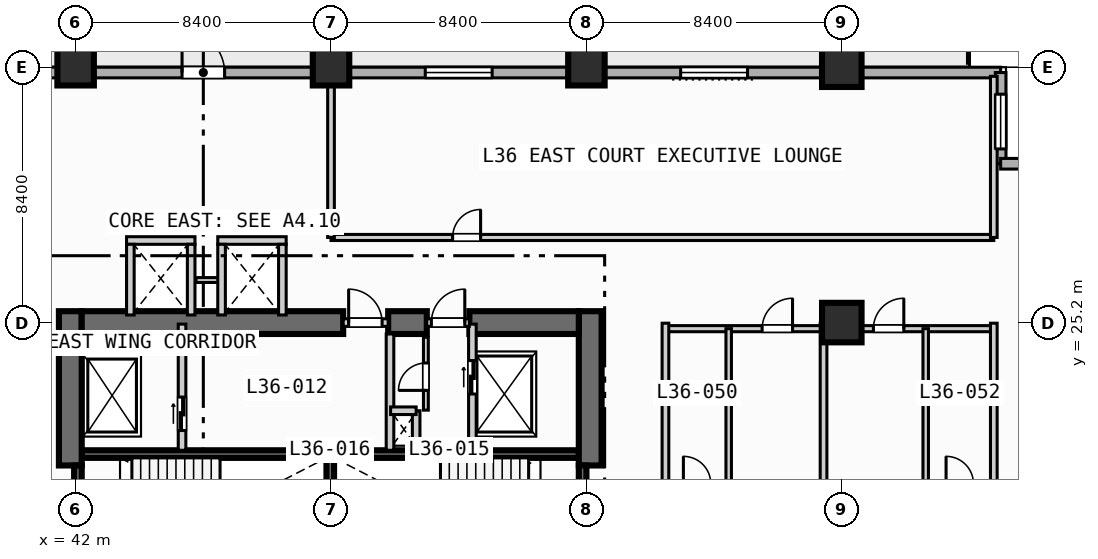
"""IFC4 building model, lengths in metres.
Left out: names, types, materials, properties, quantities, classifications, styles, units other than length and angle.
Written with IfcOpenShell. Run it as: python <this file> out.ifc"""

import sys

from ifc_helpers import new_model, si_unit, direction, frame, frame_2d, origin, origin_2d, place, context, subcontext, project, spatial, rectangle, extrude, element, fill, save


model = new_model("IFC4")
c1 = context("Model", 3, precision=1e-05, world=origin(), true_north=direction((0.0, 1.0)))
c2 = subcontext(c1, "Body", "Model", "MODEL_VIEW")
j1 = project(units=[si_unit("LENGTHUNIT", "METRE"), si_unit("PLANEANGLEUNIT", "RADIAN")], contexts=[c1])
p1 = place(None, origin())
s1 = spatial("IfcSite", under=j1, at=p1, CompositionType="ELEMENT")
p2 = place(p1, origin())
s2 = spatial("IfcBuilding", under=s1, at=p2, CompositionType="ELEMENT")
p3 = place(p2, frame((0.0, 0.0, 149.4)))
s3 = spatial("IfcBuildingStorey", under=s2, at=p3, CompositionType="ELEMENT", Elevation=149.4)
for number, where, z_axis, x_axis in (
    (1, (42.2, 20.875, 0.0), (0.0, 0.0, 1.0), (1.0, 0.0, 0.0)),
    (2, (50.5, 20.875, 0.0), (0.0, 0.0, 1.0), (1.0, 0.0, 0.0)),
):
    element("IfcWall", number, at=place(p3, frame(where, z_axis=z_axis, x_axis=x_axis)), inside=s3, PredefinedType="SOLIDWALL", context=c2, shape_type="SweptSolid", body=[
        extrude(rectangle(XDim=8.05, YDim=0.25, at=frame_2d((4.025, 0.0))), origin(), (0.0, 0.0, 1.0), 3.55),
    ])
p4 = place(p3, frame((50.375, 17.25, 0.0), z_axis=(0.0, 0.0, 1.0), x_axis=(0.0, 1.0, 0.0)))
e3 = element("IfcWall", 3, at=p4, inside=s3, PredefinedType="SOLIDWALL", context=c2, shape_type="SweptSolid", body=[
    extrude(rectangle(XDim=3.5, YDim=0.25, at=frame_2d((1.75, 0.0))), origin(), (0.0, 0.0, 1.0), 3.55),
])
for number, where, z_axis, x_axis in (
    (4, (41.825, 20.5, 0.0), (0.0, 0.0, 1.0), (0.0, 1.0, 0.0)),
    (5, (58.925, 20.5, 0.0), (0.0, 0.0, 1.0), (0.0, 1.0, 0.0)),
):
    element("IfcWall", number, at=place(p3, frame(where, z_axis=z_axis, x_axis=x_axis)), inside=s3, PredefinedType="SHEAR", context=c2, shape_type="SweptSolid", body=[
        extrude(rectangle(XDim=5.075, YDim=0.75, at=frame_2d((2.538, 0.0))), origin(), (0.0, 0.0, 1.0), 3.55),
    ])
p5 = place(p3, frame((42.2, 25.2, 0.0), z_axis=(0.0, 0.0, 1.0), x_axis=(1.0, 0.0, 0.0)))
e6 = element("IfcWall", 6, at=p5, inside=s3, PredefinedType="SHEAR", context=c2, shape_type="SweptSolid", body=[
    extrude(rectangle(XDim=8.6, YDim=0.75, at=frame_2d((4.3, 0.0))), origin(), (0.0, 0.0, 1.0), 3.55),
])
p6 = place(p3, frame((52.28, 25.2, 0.0), z_axis=(0.0, 0.0, 1.0), x_axis=(1.0, 0.0, 0.0)))
e7 = element("IfcWall", 7, at=p6, inside=s3, PredefinedType="SHEAR", context=c2, shape_type="SweptSolid", body=[
    extrude(rectangle(XDim=1.27, YDim=0.75, at=frame_2d((0.635, 0.0))), origin(), (0.0, 0.0, 1.0), 3.55),
])
p7 = place(p3, frame((54.95, 25.2, 0.0), z_axis=(0.0, 0.0, 1.0), x_axis=(1.0, 0.0, 0.0)))
e8 = element("IfcWall", 8, at=p7, inside=s3, PredefinedType="SHEAR", context=c2, shape_type="SweptSolid", body=[
    extrude(rectangle(XDim=3.6, YDim=0.75, at=frame_2d((1.8, 0.0))), origin(), (0.0, 0.0, 1.0), 3.55),
])
for number, where, z_axis, x_axis in (
    (9, (42.0, 33.6, 0.0), (0.0, 0.0, 1.0), (1.0, 0.0, 0.0)),
    (10, (50.4, 33.6, 0.0), (0.0, 0.0, 1.0), (1.0, 0.0, 0.0)),
    (11, (58.8, 33.6, 0.0), (0.0, 0.0, 1.0), (1.0, 0.0, 0.0)),
):
    element("IfcColumn", number, at=place(p3, frame(where, z_axis=z_axis, x_axis=x_axis)), inside=s3, PredefinedType="COLUMN", context=c2, shape_type="SweptSolid", body=[
        extrude(rectangle(XDim=1.2, YDim=1.2, at=origin_2d()), origin(), (0.0, 0.0, 1.0), 3.8),
    ])
for number, where, z_axis, x_axis in (
    (12, (67.2, 25.2, 0.0), (0.0, 0.0, 1.0), (1.0, 0.0, 0.0)),
    (13, (67.2, 33.6, 0.0), (0.0, 0.0, 1.0), (1.0, 0.0, 0.0)),
):
    element("IfcColumn", number, at=place(p3, frame(where, z_axis=z_axis, x_axis=x_axis)), inside=s3, PredefinedType="COLUMN", context=c2, shape_type="SweptSolid", body=[
        extrude(rectangle(XDim=1.3, YDim=1.3, at=origin_2d()), origin(), (0.0, 0.0, 1.0), 3.8),
    ])
p8 = place(p3, frame((33.425, 33.425, 0.0), z_axis=(0.0, 0.0, 1.0), x_axis=(1.0, 0.0, 0.0)))
e14 = element("IfcWall", 14, at=p8, inside=s3, PredefinedType="STANDARD", context=c2, shape_type="SweptSolid", body=[
    extrude(rectangle(XDim=39.0, YDim=0.35, at=frame_2d((19.5, 0.0))), origin(), (0.0, 0.0, 1.0), 3.55),
])
p9 = place(p8, frame((12.075, 0.0, 0.0)))
e15 = element("IfcOpeningElement", 15, at=p9, cuts=e14, PredefinedType="OPENING", context=c2, shape_type="SweptSolid", body=[
    extrude(rectangle(XDim=1.4, YDim=2.2, at=frame_2d((0.7, 1.1))), frame((0.0, 0.185, 0.0), z_axis=(0.0, -1.0, 0.0), x_axis=(1.0, 0.0, 0.0)), (0.0, 0.0, 1.0), 0.37),
])
p10 = place(p8, frame((20.075, 0.0, 0.85)))
e16 = element("IfcOpeningElement", 16, at=p10, cuts=e14, PredefinedType="OPENING", context=c2, shape_type="SweptSolid", body=[
    extrude(rectangle(XDim=2.2, YDim=1.8, at=frame_2d((1.1, 0.9))), frame((0.0, 0.185, 0.0), z_axis=(0.0, -1.0, 0.0), x_axis=(1.0, 0.0, 0.0)), (0.0, 0.0, 1.0), 0.37),
])
p11 = place(p8, frame((28.475, 0.0, 0.85)))
e17 = element("IfcOpeningElement", 17, at=p11, cuts=e14, PredefinedType="OPENING", context=c2, shape_type="SweptSolid", body=[
    extrude(rectangle(XDim=2.2, YDim=1.8, at=frame_2d((1.1, 0.9))), frame((0.0, 0.185, 0.0), z_axis=(0.0, -1.0, 0.0), x_axis=(1.0, 0.0, 0.0)), (0.0, 0.0, 1.0), 0.37),
])
p12 = place(p3, frame((72.425, 33.425, 0.0), z_axis=(0.0, 0.0, 1.0), x_axis=(0.0, -1.0, 0.0)))
e18 = element("IfcWall", 18, at=p12, inside=s3, PredefinedType="STANDARD", context=c2, shape_type="SweptSolid", body=[
    extrude(rectangle(XDim=3.0, YDim=0.35, at=frame_2d((1.5, 0.0))), origin(), (0.0, 0.0, 1.0), 3.55),
])
p13 = place(p12, frame((0.712, 0.0, 0.85)))
e19 = element("IfcOpeningElement", 19, at=p13, cuts=e18, PredefinedType="OPENING", context=c2, shape_type="SweptSolid", body=[
    extrude(rectangle(XDim=1.8, YDim=1.8, at=frame_2d((0.9, 0.9))), frame((0.0, 0.185, 0.0), z_axis=(0.0, -1.0, 0.0), x_axis=(1.0, 0.0, 0.0)), (0.0, 0.0, 1.0), 0.37),
])
p14 = place(p3, frame((72.425, 30.425, 0.0), z_axis=(0.0, 0.0, 1.0), x_axis=(1.0, 0.0, 0.0)))
e20 = element("IfcWall", 20, at=p14, inside=s3, PredefinedType="STANDARD", context=c2, shape_type="SweptSolid", body=[
    extrude(rectangle(XDim=3.0, YDim=0.35, at=frame_2d((1.5, 0.0))), origin(), (0.0, 0.0, 1.0), 3.55),
])
p15 = place(p3, frame((42.075, 18.0, 0.0), z_axis=(0.0, 0.0, 1.0), x_axis=(0.0, 1.0, 0.0)))
e21 = element("IfcWall", 21, at=p15, inside=s3, PredefinedType="SOLIDWALL", context=c2, shape_type="SweptSolid", body=[
    extrude(rectangle(XDim=2.5, YDim=0.25, at=frame_2d((1.25, 0.0))), origin(), (0.0, 0.0, 1.0), 3.55),
])
p16 = place(p15, frame((0.7, 0.0, 0.0)))
e22 = element("IfcOpeningElement", 22, at=p16, cuts=e21, PredefinedType="OPENING", context=c2, shape_type="SweptSolid", body=[
    extrude(rectangle(XDim=1.1, YDim=2.15, at=frame_2d((0.55, 1.075))), frame((0.0, 0.135, 0.0), z_axis=(0.0, -1.0, 0.0), x_axis=(1.0, 0.0, 0.0)), (0.0, 0.0, 1.0), 0.27),
])
p17 = place(p3, frame((58.675, 18.0, 0.0), z_axis=(0.0, 0.0, 1.0), x_axis=(0.0, 1.0, 0.0)))
e23 = element("IfcWall", 23, at=p17, inside=s3, PredefinedType="SOLIDWALL", context=c2, shape_type="SweptSolid", body=[
    extrude(rectangle(XDim=2.5, YDim=0.25, at=frame_2d((1.25, 0.0))), origin(), (0.0, 0.0, 1.0), 3.55),
])
p18 = place(p17, frame((0.7, 0.0, 0.0)))
e24 = element("IfcOpeningElement", 24, at=p18, cuts=e23, PredefinedType="OPENING", context=c2, shape_type="SweptSolid", body=[
    extrude(rectangle(XDim=1.1, YDim=2.15, at=frame_2d((0.55, 1.075))), frame((0.0, 0.135, 0.0), z_axis=(0.0, -1.0, 0.0), x_axis=(1.0, 0.0, 0.0)), (0.0, 0.0, 1.0), 0.27),
])
p19 = place(p3, frame((45.5, 21.0, 0.0), z_axis=(0.0, 0.0, 1.0), x_axis=(0.0, 1.0, 0.0)))
e25 = element("IfcWall", 25, at=p19, inside=s3, PredefinedType="SOLIDWALL", context=c2, shape_type="SweptSolid", body=[
    extrude(rectangle(XDim=4.15, YDim=0.25, at=frame_2d((2.075, 0.0))), origin(), (0.0, 0.0, 1.0), 3.55),
])
p20 = place(p19, frame((0.65, 0.0, 0.0)))
e26 = element("IfcOpeningElement", 26, at=p20, cuts=e25, PredefinedType="OPENING", context=c2, shape_type="SweptSolid", body=[
    extrude(rectangle(XDim=1.1, YDim=2.15, at=frame_2d((0.55, 1.075))), frame((0.0, 0.135, 0.0), z_axis=(0.0, -1.0, 0.0), x_axis=(1.0, 0.0, 0.0)), (0.0, 0.0, 1.0), 0.27),
])
p21 = place(p3, frame((50.8, 25.2, 0.0), z_axis=(0.0, 0.0, 1.0), x_axis=(1.0, 0.0, 0.0)))
e27 = element("IfcWall", 27, at=p21, inside=s3, PredefinedType="SOLIDWALL", context=c2, shape_type="SweptSolid", body=[
    extrude(rectangle(XDim=1.48, YDim=0.25, at=frame_2d((0.74, 0.0))), origin(), (0.0, 0.0, 1.0), 3.55),
])
p22 = place(p21, frame((0.18, 0.0, 0.0)))
e28 = element("IfcOpeningElement", 28, at=p22, cuts=e27, PredefinedType="OPENING", context=c2, shape_type="SweptSolid", body=[
    extrude(rectangle(XDim=1.1, YDim=2.15, at=frame_2d((0.55, 1.075))), frame((0.0, 0.135, 0.0), z_axis=(0.0, -1.0, 0.0), x_axis=(1.0, 0.0, 0.0)), (0.0, 0.0, 1.0), 0.27),
])
p23 = place(p3, frame((52.34, 21.0, 0.0), z_axis=(0.0, 0.0, 1.0), x_axis=(0.0, 1.0, 0.0)))
e29 = element("IfcWall", 29, at=p23, inside=s3, PredefinedType="SOLIDWALL", context=c2, shape_type="SweptSolid", body=[
    extrude(rectangle(XDim=3.825, YDim=0.25, at=frame_2d((1.913, 0.0))), origin(), (0.0, 0.0, 1.0), 3.55),
])
p24 = place(p3, frame((55.05, 21.0, 0.0), z_axis=(0.0, 0.0, 1.0), x_axis=(0.0, 1.0, 0.0)))
e30 = element("IfcWall", 30, at=p24, inside=s3, PredefinedType="SOLIDWALL", context=c2, shape_type="SweptSolid", body=[
    extrude(rectangle(XDim=4.15, YDim=0.25, at=frame_2d((2.075, 0.0))), origin(), (0.0, 0.0, 1.0), 3.55),
])
p25 = place(p24, frame((1.85, 0.0, 0.0)))
e31 = element("IfcOpeningElement", 31, at=p25, cuts=e30, PredefinedType="OPENING", context=c2, shape_type="SweptSolid", body=[
    extrude(rectangle(XDim=1.1, YDim=2.15, at=frame_2d((0.55, 1.075))), frame((0.0, 0.135, 0.0), z_axis=(0.0, -1.0, 0.0), x_axis=(1.0, 0.0, 0.0)), (0.0, 0.0, 1.0), 0.27),
])
p26 = place(p3, frame((53.55, 25.2, 0.0), z_axis=(0.0, 0.0, 1.0), x_axis=(1.0, 0.0, 0.0)))
e32 = element("IfcWall", 32, at=p26, inside=s3, PredefinedType="SOLIDWALL", context=c2, shape_type="SweptSolid", body=[
    extrude(rectangle(XDim=1.4, YDim=0.25, at=frame_2d((0.7, 0.0))), origin(), (0.0, 0.0, 1.0), 3.55),
])
p27 = place(p26, frame((0.15, 0.0, 0.0)))
e33 = element("IfcOpeningElement", 33, at=p27, cuts=e32, PredefinedType="OPENING", context=c2, shape_type="SweptSolid", body=[
    extrude(rectangle(XDim=1.1, YDim=2.15, at=frame_2d((0.55, 1.075))), frame((0.0, 0.135, 0.0), z_axis=(0.0, -1.0, 0.0), x_axis=(1.0, 0.0, 0.0)), (0.0, 0.0, 1.0), 0.27),
])
p28 = place(p3, frame((53.2, 21.0, 0.0), z_axis=(0.0, 0.0, 1.0), x_axis=(0.0, 1.0, 0.0)))
e34 = element("IfcWall", 34, at=p28, inside=s3, PredefinedType="SOLIDWALL", context=c2, shape_type="SweptSolid", body=[
    extrude(rectangle(XDim=1.3, YDim=0.25, at=frame_2d((0.65, 0.0))), origin(), (0.0, 0.0, 1.0), 3.55),
])
p29 = place(p3, frame((52.36, 22.3, 0.0), z_axis=(0.0, 0.0, 1.0), x_axis=(1.0, 0.0, 0.0)))
e35 = element("IfcWall", 35, at=p29, inside=s3, PredefinedType="SOLIDWALL", context=c2, shape_type="SweptSolid", body=[
    extrude(rectangle(XDim=0.84, YDim=0.25, at=frame_2d((0.42, 0.0))), origin(), (0.0, 0.0, 1.0), 3.55),
])
p30 = place(p3, frame((53.52, 22.32, 0.0), z_axis=(0.0, 0.0, 1.0), x_axis=(0.0, 1.0, 0.0)))
e36 = element("IfcWall", 36, at=p30, inside=s3, PredefinedType="PARTITIONING", context=c2, shape_type="SweptSolid", body=[
    extrude(rectangle(XDim=2.4, YDim=0.16, at=frame_2d((1.2, 0.0))), origin(), (0.0, 0.0, 1.0), 3.55),
])
p31 = place(p30, frame((0.65, 0.0, 0.0)))
e37 = element("IfcOpeningElement", 37, at=p31, cuts=e36, PredefinedType="OPENING", context=c2, shape_type="SweptSolid", body=[
    extrude(rectangle(XDim=0.9, YDim=2.1, at=frame_2d((0.45, 1.05))), frame((0.0, 0.09, 0.0), z_axis=(0.0, -1.0, 0.0), x_axis=(1.0, 0.0, 0.0)), (0.0, 0.0, 1.0), 0.18),
])
p32 = place(p3, frame((43.675, 27.9, 0.0), z_axis=(0.0, 0.0, 1.0), x_axis=(1.0, 0.0, 0.0)))
e38 = element("IfcWall", 38, at=p32, inside=s3, PredefinedType="SOLIDWALL", context=c2, shape_type="SweptSolid", body=[
    extrude(rectangle(XDim=2.25, YDim=0.25, at=frame_2d((1.125, 0.0))), origin(), (0.0, 0.0, 1.0), 3.55),
])
for number, where, z_axis, x_axis in (
    (39, (43.8, 25.45, 0.0), (0.0, 0.0, 1.0), (0.0, 1.0, 0.0)),
    (40, (45.8, 25.45, 0.0), (0.0, 0.0, 1.0), (0.0, 1.0, 0.0)),
):
    element("IfcWall", number, at=place(p3, frame(where, z_axis=z_axis, x_axis=x_axis)), inside=s3, PredefinedType="SOLIDWALL", context=c2, shape_type="SweptSolid", body=[
        extrude(rectangle(XDim=2.325, YDim=0.25, at=frame_2d((1.163, 0.0))), origin(), (0.0, 0.0, 1.0), 3.55),
    ])
p33 = place(p3, frame((45.96, 26.6, 0.0), z_axis=(0.0, 0.0, 1.0), x_axis=(1.0, 0.0, 0.0)))
e41 = element("IfcWall", 41, at=p33, inside=s3, PredefinedType="PARTITIONING", context=c2, shape_type="SweptSolid", body=[
    extrude(rectangle(XDim=0.88, YDim=0.16, at=frame_2d((0.44, 0.0))), origin(), (0.0, 0.0, 1.0), 3.55),
])
p34 = place(p3, frame((46.675, 27.9, 0.0), z_axis=(0.0, 0.0, 1.0), x_axis=(1.0, 0.0, 0.0)))
e42 = element("IfcWall", 42, at=p34, inside=s3, PredefinedType="SOLIDWALL", context=c2, shape_type="SweptSolid", body=[
    extrude(rectangle(XDim=2.25, YDim=0.25, at=frame_2d((1.125, 0.0))), origin(), (0.0, 0.0, 1.0), 3.55),
])
for number, where, z_axis, x_axis in (
    (43, (46.8, 25.45, 0.0), (0.0, 0.0, 1.0), (0.0, 1.0, 0.0)),
    (44, (48.8, 25.45, 0.0), (0.0, 0.0, 1.0), (0.0, 1.0, 0.0)),
):
    element("IfcWall", number, at=place(p3, frame(where, z_axis=z_axis, x_axis=x_axis)), inside=s3, PredefinedType="SOLIDWALL", context=c2, shape_type="SweptSolid", body=[
        extrude(rectangle(XDim=2.325, YDim=0.25, at=frame_2d((1.163, 0.0))), origin(), (0.0, 0.0, 1.0), 3.55),
    ])
p35 = place(p3, frame((61.4, 25.0, 0.0), z_axis=(0.0, 0.0, 1.0), x_axis=(1.0, 0.0, 0.0)))
e45 = element("IfcWall", 45, at=p35, inside=s3, PredefinedType="PARTITIONING", context=c2, shape_type="SweptSolid", body=[
    extrude(rectangle(XDim=10.8, YDim=0.2, at=frame_2d((5.4, 0.0))), origin(), (0.0, 0.0, 1.0), 2.9),
])
p36 = place(p35, frame((3.18, 0.0, 0.0)))
e46 = element("IfcOpeningElement", 46, at=p36, cuts=e45, PredefinedType="OPENING", context=c2, shape_type="SweptSolid", body=[
    extrude(rectangle(XDim=1.0, YDim=2.15, at=frame_2d((0.5, 1.075))), frame((0.0, 0.11, 0.0), z_axis=(0.0, -1.0, 0.0), x_axis=(1.0, 0.0, 0.0)), (0.0, 0.0, 1.0), 0.22),
])
p37 = place(p35, frame((6.84, 0.0, 0.0)))
e47 = element("IfcOpeningElement", 47, at=p37, cuts=e45, PredefinedType="OPENING", context=c2, shape_type="SweptSolid", body=[
    extrude(rectangle(XDim=1.0, YDim=2.15, at=frame_2d((0.5, 1.075))), frame((0.0, 0.11, 0.0), z_axis=(0.0, -1.0, 0.0), x_axis=(1.0, 0.0, 0.0)), (0.0, 0.0, 1.0), 0.22),
])
p38 = place(p3, frame((61.4, 0.2, 0.0), z_axis=(0.0, 0.0, 1.0), x_axis=(0.0, 1.0, 0.0)))
e48 = element("IfcWall", 48, at=p38, inside=s3, PredefinedType="PARTITIONING", context=c2, shape_type="SweptSolid", body=[
    extrude(rectangle(XDim=24.98, YDim=0.22, at=frame_2d((12.49, 0.0))), origin(), (0.0, 0.0, 1.0), 3.55),
])
p39 = place(p3, frame((63.48, 19.9, 0.0), z_axis=(0.0, 0.0, 1.0), x_axis=(0.0, 1.0, 0.0)))
e49 = element("IfcWall", 49, at=p39, inside=s3, PredefinedType="PLUMBINGWALL", context=c2, shape_type="SweptSolid", body=[
    extrude(rectangle(XDim=5.1, YDim=0.18, at=frame_2d((2.55, 0.0))), origin(), (0.0, 0.0, 1.0), 3.55),
])
for number, where, z_axis, x_axis in (
    (50, (66.6, 0.2, 0.0), (0.0, 0.0, 1.0), (0.0, 1.0, 0.0)),
    (51, (72.2, 0.2, 0.0), (0.0, 0.0, 1.0), (0.0, 1.0, 0.0)),
):
    element("IfcWall", number, at=place(p3, frame(where, z_axis=z_axis, x_axis=x_axis)), inside=s3, PredefinedType="PARTITIONING", context=c2, shape_type="SweptSolid", body=[
        extrude(rectangle(XDim=24.98, YDim=0.22, at=frame_2d((12.49, 0.0))), origin(), (0.0, 0.0, 1.0), 3.55),
    ])
p40 = place(p3, frame((69.96, 19.9, 0.0), z_axis=(0.0, 0.0, 1.0), x_axis=(0.0, 1.0, 0.0)))
e52 = element("IfcWall", 52, at=p40, inside=s3, PredefinedType="PLUMBINGWALL", context=c2, shape_type="SweptSolid", body=[
    extrude(rectangle(XDim=5.1, YDim=0.18, at=frame_2d((2.55, 0.0))), origin(), (0.0, 0.0, 1.0), 3.55),
])
p41 = place(p3, frame((50.4, 28.0, 0.0), z_axis=(0.0, 0.0, 1.0), x_axis=(1.0, 0.0, 0.0)))
e53 = element("IfcWall", 53, at=p41, inside=s3, PredefinedType="PARTITIONING", context=c2, shape_type="SweptSolid", body=[
    extrude(rectangle(XDim=21.8, YDim=0.2, at=frame_2d((10.9, 0.0))), origin(), (0.0, 0.0, 1.0), 3.55),
])
p42 = place(p41, frame((4.0, 0.0, 0.0)))
e54 = element("IfcOpeningElement", 54, at=p42, cuts=e53, PredefinedType="OPENING", context=c2, shape_type="SweptSolid", body=[
    extrude(rectangle(XDim=0.92, YDim=2.1, at=frame_2d((0.46, 1.05))), frame((0.0, 0.11, 0.0), z_axis=(0.0, -1.0, 0.0), x_axis=(1.0, 0.0, 0.0)), (0.0, 0.0, 1.0), 0.22),
])
p43 = place(p3, frame((50.4, 28.0, 0.0), z_axis=(0.0, 0.0, 1.0), x_axis=(0.0, 1.0, 0.0)))
e55 = element("IfcWall", 55, at=p43, inside=s3, PredefinedType="PARTITIONING", context=c2, shape_type="SweptSolid", body=[
    extrude(rectangle(XDim=5.3, YDim=0.22, at=frame_2d((2.65, 0.0))), origin(), (0.0, 0.0, 1.0), 2.9),
])
p44 = place(p3, frame((72.2, 28.0, 0.0), z_axis=(0.0, 0.0, 1.0), x_axis=(0.0, 1.0, 0.0)))
e56 = element("IfcWall", 56, at=p44, inside=s3, PredefinedType="PARTITIONING", context=c2, shape_type="SweptSolid", body=[
    extrude(rectangle(XDim=5.3, YDim=0.22, at=frame_2d((2.65, 0.0))), origin(), (0.0, 0.0, 1.0), 3.55),
])
p45 = place(p9, origin())
e57 = element("IfcDoor", 57, at=p45, inside=s3, OperationType="SINGLE_SWING_LEFT", PredefinedType="DOOR", context=c2, shape_type="SweptSolid", body=[
    extrude(rectangle(XDim=1.4, YDim=2.2, at=frame_2d((0.7, 1.1))), frame((0.0, 0.025, 0.0), z_axis=(0.0, -1.0, 0.0), x_axis=(1.0, 0.0, 0.0)), (0.0, 0.0, 1.0), 0.05),
])
fill(e15, e57)
p46 = place(p10, origin())
e58 = element("IfcWindow", 58, at=p46, inside=s3, PartitioningType="SINGLE_PANEL", PredefinedType="WINDOW", context=c2, shape_type="SweptSolid", body=[
    extrude(rectangle(XDim=2.2, YDim=1.8, at=frame_2d((1.1, 0.9))), frame((0.0, 0.03, 0.0), z_axis=(0.0, -1.0, 0.0), x_axis=(1.0, 0.0, 0.0)), (0.0, 0.0, 1.0), 0.06),
])
fill(e16, e58)
p47 = place(p11, origin())
e59 = element("IfcWindow", 59, at=p47, inside=s3, PartitioningType="SINGLE_PANEL", PredefinedType="WINDOW", context=c2, shape_type="SweptSolid", body=[
    extrude(rectangle(XDim=2.2, YDim=1.8, at=frame_2d((1.1, 0.9))), frame((0.0, 0.03, 0.0), z_axis=(0.0, -1.0, 0.0), x_axis=(1.0, 0.0, 0.0)), (0.0, 0.0, 1.0), 0.06),
])
fill(e17, e59)
p48 = place(p13, origin())
e60 = element("IfcWindow", 60, at=p48, inside=s3, PartitioningType="SINGLE_PANEL", PredefinedType="WINDOW", context=c2, shape_type="SweptSolid", body=[
    extrude(rectangle(XDim=1.8, YDim=1.8, at=frame_2d((0.9, 0.9))), frame((0.0, 0.03, 0.0), z_axis=(0.0, -1.0, 0.0), x_axis=(1.0, 0.0, 0.0)), (0.0, 0.0, 1.0), 0.06),
])
fill(e19, e60)
p49 = place(p20, origin())
e61 = element("IfcDoor", 61, at=p49, inside=s3, OperationType="SLIDING_TO_LEFT", PredefinedType="DOOR", context=c2, shape_type="SweptSolid", body=[
    extrude(rectangle(XDim=1.1, YDim=2.15, at=frame_2d((0.55, 1.075))), frame((0.0, 0.025, 0.0), z_axis=(0.0, -1.0, 0.0), x_axis=(1.0, 0.0, 0.0)), (0.0, 0.0, 1.0), 0.05),
])
fill(e26, e61)
p50 = place(p22, origin())
e62 = element("IfcDoor", 62, at=p50, inside=s3, OperationType="SINGLE_SWING_LEFT", PredefinedType="DOOR", context=c2, shape_type="SweptSolid", body=[
    extrude(rectangle(XDim=1.1, YDim=2.15, at=frame_2d((0.55, 1.075))), frame((0.0, 0.025, 0.0), z_axis=(0.0, -1.0, 0.0), x_axis=(1.0, 0.0, 0.0)), (0.0, 0.0, 1.0), 0.05),
])
fill(e28, e62)
p51 = place(p25, origin())
e63 = element("IfcDoor", 63, at=p51, inside=s3, OperationType="SLIDING_TO_LEFT", PredefinedType="DOOR", context=c2, shape_type="SweptSolid", body=[
    extrude(rectangle(XDim=1.1, YDim=2.15, at=frame_2d((0.55, 1.075))), frame((0.0, 0.025, 0.0), z_axis=(0.0, -1.0, 0.0), x_axis=(1.0, 0.0, 0.0)), (0.0, 0.0, 1.0), 0.05),
])
fill(e31, e63)
p52 = place(p27, origin())
e64 = element("IfcDoor", 64, at=p52, inside=s3, OperationType="SINGLE_SWING_RIGHT", PredefinedType="DOOR", context=c2, shape_type="SweptSolid", body=[
    extrude(rectangle(XDim=1.1, YDim=2.15, at=frame_2d((0.55, 1.075))), frame((0.0, 0.025, 0.0), z_axis=(0.0, -1.0, 0.0), x_axis=(1.0, 0.0, 0.0)), (0.0, 0.0, 1.0), 0.05),
])
fill(e33, e64)
p53 = place(p31, origin())
e65 = element("IfcDoor", 65, at=p53, inside=s3, OperationType="SINGLE_SWING_LEFT", PredefinedType="DOOR", context=c2, shape_type="SweptSolid", body=[
    extrude(rectangle(XDim=0.9, YDim=2.1, at=frame_2d((0.45, 1.05))), frame((0.0, 0.025, 0.0), z_axis=(0.0, -1.0, 0.0), x_axis=(1.0, 0.0, 0.0)), (0.0, 0.0, 1.0), 0.05),
])
fill(e37, e65)
p54 = place(p36, origin())
e66 = element("IfcDoor", 66, at=p54, inside=s3, OperationType="SINGLE_SWING_RIGHT", PredefinedType="DOOR", context=c2, shape_type="SweptSolid", body=[
    extrude(rectangle(XDim=1.0, YDim=2.15, at=frame_2d((0.5, 1.075))), frame((0.0, 0.025, 0.0), z_axis=(0.0, -1.0, 0.0), x_axis=(1.0, 0.0, 0.0)), (0.0, 0.0, 1.0), 0.05),
])
fill(e46, e66)
p55 = place(p37, origin())
e67 = element("IfcDoor", 67, at=p55, inside=s3, OperationType="SINGLE_SWING_RIGHT", PredefinedType="DOOR", context=c2, shape_type="SweptSolid", body=[
    extrude(rectangle(XDim=1.0, YDim=2.15, at=frame_2d((0.5, 1.075))), frame((0.0, 0.025, 0.0), z_axis=(0.0, -1.0, 0.0), x_axis=(1.0, 0.0, 0.0)), (0.0, 0.0, 1.0), 0.05),
])
fill(e47, e67)
p56 = place(p42, origin())
e68 = element("IfcDoor", 68, at=p56, inside=s3, OperationType="SINGLE_SWING_RIGHT", PredefinedType="DOOR", context=c2, shape_type="SweptSolid", body=[
    extrude(rectangle(XDim=0.92, YDim=2.1, at=frame_2d((0.46, 1.05))), frame((0.0, 0.025, 0.0), z_axis=(0.0, -1.0, 0.0), x_axis=(1.0, 0.0, 0.0)), (0.0, 0.0, 1.0), 0.05),
])
fill(e54, e68)
save(model, sys.argv[1])
